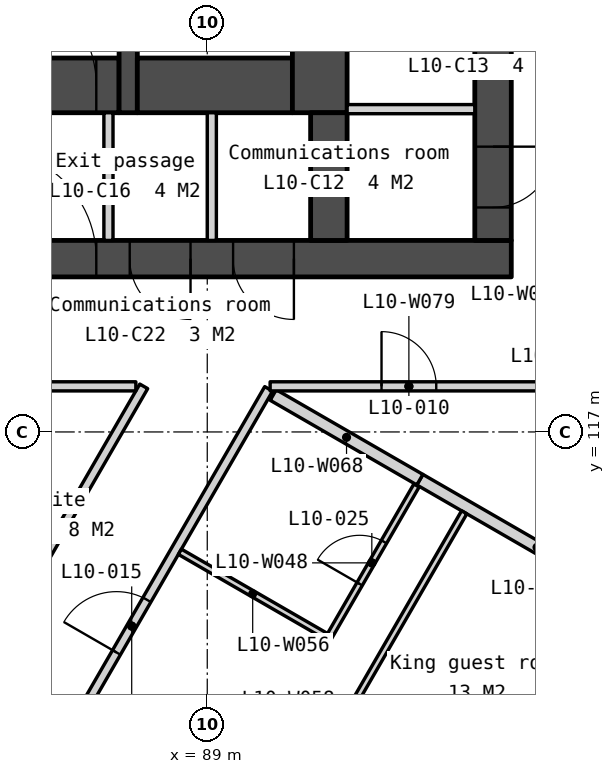
"""IFC4 building model, lengths in metres.
Left out: names, types, materials, properties, quantities, classifications, styles, units other than length and angle.
Written with IfcOpenShell. Run it as: python <this file> out.ifc"""

import sys

from ifc_helpers import new_model, si_unit, direction, frame, frame_2d, origin, place, context, subcontext, project, spatial, polyline, rectangle, outline, extrude, element, fill, save


model = new_model("IFC4")
c1 = context("Model", 3, precision=1e-05, world=origin(), true_north=direction((0.0, 1.0)))
c2 = subcontext(c1, "Body", "Model", "MODEL_VIEW")
j1 = project(units=[si_unit("LENGTHUNIT", "METRE"), si_unit("PLANEANGLEUNIT", "RADIAN")], contexts=[c1])
p1 = place(None, origin())
s1 = spatial("IfcSite", under=j1, at=p1, CompositionType="ELEMENT")
p2 = place(p1, origin())
s2 = spatial("IfcBuilding", under=s1, at=p2, CompositionType="ELEMENT")
p3 = place(p2, frame((0.0, 0.0, 49.0)))
s3 = spatial("IfcBuildingStorey", under=s2, at=p3, CompositionType="ELEMENT", Elevation=49.0)
p4 = place(p3, frame((66.0, 119.85, 0.0), z_axis=(0.0, 0.0, 1.0), x_axis=(1.0, 0.0, 0.0)))
e1 = element("IfcWall", 1, at=p4, inside=s3, PredefinedType="SOLIDWALL", context=c2, shape_type="SweptSolid", body=[
    extrude(rectangle(XDim=28.0, YDim=0.6, at=frame_2d((14.0, 0.0))), origin(), (0.0, 0.0, 1.0), 3.35),
])
p5 = place(p4, frame((6.825, 0.0, 0.0)))
e2 = element("IfcOpeningElement", 2, at=p5, cuts=e1, PredefinedType="OPENING", context=c2, shape_type="SweptSolid", body=[
    extrude(rectangle(XDim=1.8, YDim=2.1, at=frame_2d((0.9, 1.05))), frame((0.0, 0.31, 0.0), z_axis=(0.0, -1.0, 0.0), x_axis=(1.0, 0.0, 0.0)), (0.0, 0.0, 1.0), 0.62),
])
p6 = place(p4, frame((15.85, 0.0, 0.0)))
e3 = element("IfcOpeningElement", 3, at=p6, cuts=e1, PredefinedType="OPENING", context=c2, shape_type="SweptSolid", body=[
    extrude(rectangle(XDim=1.5, YDim=2.1, at=frame_2d((0.75, 1.05))), frame((0.0, 0.31, 0.0), z_axis=(0.0, -1.0, 0.0), x_axis=(1.0, 0.0, 0.0)), (0.0, 0.0, 1.0), 0.62),
])
p7 = place(p4, frame((19.375, 0.0, 0.0)))
e4 = element("IfcOpeningElement", 4, at=p7, cuts=e1, PredefinedType="OPENING", context=c2, shape_type="SweptSolid", body=[
    extrude(rectangle(XDim=1.8, YDim=2.1, at=frame_2d((0.9, 1.05))), frame((0.0, 0.31, 0.0), z_axis=(0.0, -1.0, 0.0), x_axis=(1.0, 0.0, 0.0)), (0.0, 0.0, 1.0), 0.62),
])
p8 = place(p4, frame((4.425, 0.0, 0.0)))
e5 = element("IfcOpeningElement", 5, at=p8, cuts=e1, PredefinedType="OPENING", context=c2, shape_type="SweptSolid", body=[
    extrude(rectangle(XDim=1.0, YDim=2.1, at=frame_2d((0.5, 1.05))), frame((0.0, 0.31, 0.0), z_axis=(0.0, -1.0, 0.0), x_axis=(1.0, 0.0, 0.0)), (0.0, 0.0, 1.0), 0.62),
])
p9 = place(p4, frame((9.783, 0.0, 0.0)))
e6 = element("IfcOpeningElement", 6, at=p9, cuts=e1, PredefinedType="OPENING", context=c2, shape_type="SweptSolid", body=[
    extrude(rectangle(XDim=1.0, YDim=2.1, at=frame_2d((0.5, 1.05))), frame((0.0, 0.31, 0.0), z_axis=(0.0, -1.0, 0.0), x_axis=(1.0, 0.0, 0.0)), (0.0, 0.0, 1.0), 0.62),
])
p10 = place(p4, frame((11.525, 0.0, 0.0)))
e7 = element("IfcOpeningElement", 7, at=p10, cuts=e1, PredefinedType="OPENING", context=c2, shape_type="SweptSolid", body=[
    extrude(rectangle(XDim=1.0, YDim=2.1, at=frame_2d((0.5, 1.05))), frame((0.0, 0.31, 0.0), z_axis=(0.0, -1.0, 0.0), x_axis=(1.0, 0.0, 0.0)), (0.0, 0.0, 1.0), 0.62),
])
p11 = place(p4, frame((13.658, 0.0, 0.0)))
e8 = element("IfcOpeningElement", 8, at=p11, cuts=e1, PredefinedType="OPENING", context=c2, shape_type="SweptSolid", body=[
    extrude(rectangle(XDim=1.0, YDim=2.1, at=frame_2d((0.5, 1.05))), frame((0.0, 0.31, 0.0), z_axis=(0.0, -1.0, 0.0), x_axis=(1.0, 0.0, 0.0)), (0.0, 0.0, 1.0), 0.62),
])
p12 = place(p4, frame((21.725, 0.0, 0.0)))
e9 = element("IfcOpeningElement", 9, at=p12, cuts=e1, PredefinedType="OPENING", context=c2, shape_type="SweptSolid", body=[
    extrude(rectangle(XDim=1.0, YDim=2.1, at=frame_2d((0.5, 1.05))), frame((0.0, 0.31, 0.0), z_axis=(0.0, -1.0, 0.0), x_axis=(1.0, 0.0, 0.0)), (0.0, 0.0, 1.0), 0.62),
])
p13 = place(p4, frame((23.425, 0.0, 0.0)))
e10 = element("IfcOpeningElement", 10, at=p13, cuts=e1, PredefinedType="OPENING", context=c2, shape_type="SweptSolid", body=[
    extrude(rectangle(XDim=1.0, YDim=2.1, at=frame_2d((0.5, 1.05))), frame((0.0, 0.31, 0.0), z_axis=(0.0, -1.0, 0.0), x_axis=(1.0, 0.0, 0.0)), (0.0, 0.0, 1.0), 0.62),
])
p14 = place(p3, frame((85.0, 122.7, 0.0), z_axis=(0.0, 0.0, 1.0), x_axis=(1.0, 0.0, 0.0)))
e11 = element("IfcWall", 11, at=p14, inside=s3, PredefinedType="SOLIDWALL", context=c2, shape_type="SweptSolid", body=[
    extrude(rectangle(XDim=2.55, YDim=0.9, at=frame_2d((1.275, 0.0))), origin(), (0.0, 0.0, 1.0), 3.35),
])
p15 = place(p14, frame((0.375, 0.0, 0.0)))
e12 = element("IfcOpeningElement", 12, at=p15, cuts=e11, PredefinedType="OPENING", context=c2, shape_type="SweptSolid", body=[
    extrude(rectangle(XDim=1.8, YDim=2.1, at=frame_2d((0.9, 1.05))), frame((0.0, 0.46, 0.0), z_axis=(0.0, -1.0, 0.0), x_axis=(1.0, 0.0, 0.0)), (0.0, 0.0, 1.0), 0.92),
])
p16 = place(p3, frame((87.375, 122.25, 0.0), z_axis=(0.0, 0.0, 1.0), x_axis=(0.0, -1.0, 0.0)))
e13 = element("IfcWall", 13, at=p16, inside=s3, PredefinedType="PARTITIONING", context=c2, shape_type="SweptSolid", body=[
    extrude(rectangle(XDim=2.1, YDim=0.15, at=frame_2d((1.05, 0.0))), origin(), (0.0, 0.0, 1.0), 3.35),
])
p17 = place(p3, frame((87.7, 133.95, 0.0), z_axis=(0.0, 0.0, 1.0), x_axis=(0.0, -1.0, 0.0)))
e14 = element("IfcWall", 14, at=p17, inside=s3, PredefinedType="SOLIDWALL", context=c2, shape_type="SweptSolid", body=[
    extrude(rectangle(XDim=11.7, YDim=0.3, at=frame_2d((5.85, 0.0))), origin(), (0.0, 0.0, 1.0), 3.35),
])
p18 = place(p17, frame((6.95, 0.0, 0.0)))
e15 = element("IfcOpeningElement", 15, at=p18, cuts=e14, PredefinedType="OPENING", context=c2, shape_type="SweptSolid", body=[
    extrude(rectangle(XDim=1.1, YDim=2.1, at=frame_2d((0.55, 1.05))), frame((0.0, 0.16, 0.0), z_axis=(0.0, -1.0, 0.0), x_axis=(1.0, 0.0, 0.0)), (0.0, 0.0, 1.0), 0.32),
])
p19 = place(p17, frame((5.1, 0.0, 0.0)))
e16 = element("IfcOpeningElement", 16, at=p19, cuts=e14, PredefinedType="OPENING", context=c2, shape_type="SweptSolid", body=[
    extrude(rectangle(XDim=1.0, YDim=2.1, at=frame_2d((0.5, 1.05))), frame((0.0, 0.16, 0.0), z_axis=(0.0, -1.0, 0.0), x_axis=(1.0, 0.0, 0.0)), (0.0, 0.0, 1.0), 0.32),
])
p20 = place(p17, frame((9.25, 0.0, 0.0)))
e17 = element("IfcOpeningElement", 17, at=p20, cuts=e14, PredefinedType="OPENING", context=c2, shape_type="SweptSolid", body=[
    extrude(rectangle(XDim=1.1, YDim=2.1, at=frame_2d((0.55, 1.05))), frame((0.0, 0.16, 0.0), z_axis=(0.0, -1.0, 0.0), x_axis=(1.0, 0.0, 0.0)), (0.0, 0.0, 1.0), 0.32),
])
p21 = place(p3, frame((87.85, 122.7, 0.0), z_axis=(0.0, 0.0, 1.0), x_axis=(1.0, 0.0, 0.0)))
e18 = element("IfcWall", 18, at=p21, inside=s3, PredefinedType="SOLIDWALL", context=c2, shape_type="SweptSolid", body=[
    extrude(rectangle(XDim=2.55, YDim=0.9, at=frame_2d((1.275, 0.0))), origin(), (0.0, 0.0, 1.0), 3.35),
])
p22 = place(p3, frame((89.075, 122.25, 0.0), z_axis=(0.0, 0.0, 1.0), x_axis=(0.0, -1.0, 0.0)))
e19 = element("IfcWall", 19, at=p22, inside=s3, PredefinedType="PARTITIONING", context=c2, shape_type="SweptSolid", body=[
    extrude(rectangle(XDim=2.1, YDim=0.15, at=frame_2d((1.05, 0.0))), origin(), (0.0, 0.0, 1.0), 3.35),
])
p23 = place(p3, frame((90.85, 133.95, 0.0), z_axis=(0.0, 0.0, 1.0), x_axis=(0.0, -1.0, 0.0)))
e20 = element("IfcWall", 20, at=p23, inside=s3, PredefinedType="SOLIDWALL", context=c2, shape_type="SweptSolid", body=[
    extrude(rectangle(XDim=11.7, YDim=0.9, at=frame_2d((5.85, 0.0))), origin(), (0.0, 0.0, 1.0), 3.35),
])
p24 = place(p3, frame((91.0, 122.25, 0.0), z_axis=(0.0, 0.0, 1.0), x_axis=(0.0, -1.0, 0.0)))
e21 = element("IfcWall", 21, at=p24, inside=s3, PredefinedType="SOLIDWALL", context=c2, shape_type="SweptSolid", body=[
    extrude(rectangle(XDim=2.1, YDim=0.6, at=frame_2d((1.05, 0.0))), origin(), (0.0, 0.0, 1.0), 3.35),
])
p25 = place(p3, frame((91.3, 122.309, 0.0), z_axis=(0.0, 0.0, 1.0), x_axis=(1.0, 0.0, 0.0)))
e22 = element("IfcWall", 22, at=p25, inside=s3, PredefinedType="PARTITIONING", context=c2, shape_type="SweptSolid", body=[
    extrude(rectangle(XDim=2.1, YDim=0.15, at=frame_2d((1.05, 0.0))), origin(), (0.0, 0.0, 1.0), 3.35),
])
p26 = place(p3, frame((93.7, 133.95, 0.0), z_axis=(0.0, 0.0, 1.0), x_axis=(0.0, -1.0, 0.0)))
e23 = element("IfcWall", 23, at=p26, inside=s3, PredefinedType="SOLIDWALL", context=c2, shape_type="SweptSolid", body=[
    extrude(rectangle(XDim=13.8, YDim=0.6, at=frame_2d((6.9, 0.0))), origin(), (0.0, 0.0, 1.0), 3.35),
])
p27 = place(p26, frame((0.6, 0.0, 0.0)))
e24 = element("IfcOpeningElement", 24, at=p27, cuts=e23, PredefinedType="OPENING", context=c2, shape_type="SweptSolid", body=[
    extrude(rectangle(XDim=1.1, YDim=2.1, at=frame_2d((0.55, 1.05))), frame((0.0, 0.31, 0.0), z_axis=(0.0, -1.0, 0.0), x_axis=(1.0, 0.0, 0.0)), (0.0, 0.0, 1.0), 0.62),
])
p28 = place(p26, frame((8.35, 0.0, 0.0)))
e25 = element("IfcOpeningElement", 25, at=p28, cuts=e23, PredefinedType="OPENING", context=c2, shape_type="SweptSolid", body=[
    extrude(rectangle(XDim=0.826, YDim=2.1, at=frame_2d((0.413, 1.05))), frame((0.0, 0.31, 0.0), z_axis=(0.0, -1.0, 0.0), x_axis=(1.0, 0.0, 0.0)), (0.0, 0.0, 1.0), 0.62),
])
p29 = place(p26, frame((10.071, 0.0, 0.0)))
e26 = element("IfcOpeningElement", 26, at=p29, cuts=e23, PredefinedType="OPENING", context=c2, shape_type="SweptSolid", body=[
    extrude(rectangle(XDim=1.0, YDim=2.1, at=frame_2d((0.5, 1.05))), frame((0.0, 0.31, 0.0), z_axis=(0.0, -1.0, 0.0), x_axis=(1.0, 0.0, 0.0)), (0.0, 0.0, 1.0), 0.62),
])
p30 = place(p26, frame((12.258, 0.0, 0.0)))
e27 = element("IfcOpeningElement", 27, at=p30, cuts=e23, PredefinedType="OPENING", context=c2, shape_type="SweptSolid", body=[
    extrude(rectangle(XDim=1.0, YDim=2.1, at=frame_2d((0.5, 1.05))), frame((0.0, 0.31, 0.0), z_axis=(0.0, -1.0, 0.0), x_axis=(1.0, 0.0, 0.0)), (0.0, 0.0, 1.0), 0.62),
])
p31 = place(p3, frame((83.105, 90.599, -0.15), z_axis=(0.0, 0.0, 1.0), x_axis=(0.499999201451, 0.866025864826, 0.0)))
e28 = element("IfcWall", 28, at=p31, inside=s3, PredefinedType="SOLIDWALL", context=c2, shape_type="SweptSolid", body=[
    extrude(outline(polyline([(44.8, 0.0), (44.8, 3.5), (0.0, 3.5), (0.0, 0.0), (44.8, 0.0)])), frame((0.0, 0.225, 0.0), z_axis=(0.0, -1.0, 0.0), x_axis=(1.0, 0.0, 0.0)), (0.0, 0.0, 1.0), 0.45),
])
p32 = place(p31, frame((2.43, 0.0, 1.05)))
e29 = element("IfcOpeningElement", 29, at=p32, cuts=e28, PredefinedType="OPENING", context=c2, shape_type="SweptSolid", body=[
    extrude(rectangle(XDim=1.8, YDim=1.5, at=frame_2d((0.9, 0.75))), frame((0.0, 0.235, 0.0), z_axis=(0.0, -1.0, 0.0), x_axis=(1.0, 0.0, 0.0)), (0.0, 0.0, 1.0), 0.47),
])
p33 = place(p31, frame((4.73, 0.0, 1.05)))
e30 = element("IfcOpeningElement", 30, at=p33, cuts=e28, PredefinedType="OPENING", context=c2, shape_type="SweptSolid", body=[
    extrude(rectangle(XDim=1.8, YDim=1.5, at=frame_2d((0.9, 0.75))), frame((0.0, 0.235, 0.0), z_axis=(0.0, -1.0, 0.0), x_axis=(1.0, 0.0, 0.0)), (0.0, 0.0, 1.0), 0.47),
])
p34 = place(p31, frame((11.39, 0.0, 1.05)))
e31 = element("IfcOpeningElement", 31, at=p34, cuts=e28, PredefinedType="OPENING", context=c2, shape_type="SweptSolid", body=[
    extrude(rectangle(XDim=1.8, YDim=1.5, at=frame_2d((0.9, 0.75))), frame((0.0, 0.235, 0.0), z_axis=(0.0, -1.0, 0.0), x_axis=(1.0, 0.0, 0.0)), (0.0, 0.0, 1.0), 0.47),
])
p35 = place(p31, frame((13.69, 0.0, 1.05)))
e32 = element("IfcOpeningElement", 32, at=p35, cuts=e28, PredefinedType="OPENING", context=c2, shape_type="SweptSolid", body=[
    extrude(rectangle(XDim=1.8, YDim=1.5, at=frame_2d((0.9, 0.75))), frame((0.0, 0.235, 0.0), z_axis=(0.0, -1.0, 0.0), x_axis=(1.0, 0.0, 0.0)), (0.0, 0.0, 1.0), 0.47),
])
p36 = place(p31, frame((20.35, 0.0, 1.05)))
e33 = element("IfcOpeningElement", 33, at=p36, cuts=e28, PredefinedType="OPENING", context=c2, shape_type="SweptSolid", body=[
    extrude(rectangle(XDim=1.8, YDim=1.5, at=frame_2d((0.9, 0.75))), frame((0.0, 0.235, 0.0), z_axis=(0.0, -1.0, 0.0), x_axis=(1.0, 0.0, 0.0)), (0.0, 0.0, 1.0), 0.47),
])
p37 = place(p31, frame((22.65, 0.0, 1.05)))
e34 = element("IfcOpeningElement", 34, at=p37, cuts=e28, PredefinedType="OPENING", context=c2, shape_type="SweptSolid", body=[
    extrude(rectangle(XDim=1.8, YDim=1.5, at=frame_2d((0.9, 0.75))), frame((0.0, 0.235, 0.0), z_axis=(0.0, -1.0, 0.0), x_axis=(1.0, 0.0, 0.0)), (0.0, 0.0, 1.0), 0.47),
])
p38 = place(p31, frame((29.31, 0.0, 1.05)))
e35 = element("IfcOpeningElement", 35, at=p38, cuts=e28, PredefinedType="OPENING", context=c2, shape_type="SweptSolid", body=[
    extrude(rectangle(XDim=1.8, YDim=1.5, at=frame_2d((0.9, 0.75))), frame((0.0, 0.235, 0.0), z_axis=(0.0, -1.0, 0.0), x_axis=(1.0, 0.0, 0.0)), (0.0, 0.0, 1.0), 0.47),
])
p39 = place(p31, frame((31.61, 0.0, 1.05)))
e36 = element("IfcOpeningElement", 36, at=p39, cuts=e28, PredefinedType="OPENING", context=c2, shape_type="SweptSolid", body=[
    extrude(rectangle(XDim=1.8, YDim=1.5, at=frame_2d((0.9, 0.75))), frame((0.0, 0.235, 0.0), z_axis=(0.0, -1.0, 0.0), x_axis=(1.0, 0.0, 0.0)), (0.0, 0.0, 1.0), 0.47),
])
p40 = place(p31, frame((38.27, 0.0, 1.05)))
e37 = element("IfcOpeningElement", 37, at=p40, cuts=e28, PredefinedType="OPENING", context=c2, shape_type="SweptSolid", body=[
    extrude(rectangle(XDim=1.8, YDim=1.5, at=frame_2d((0.9, 0.75))), frame((0.0, 0.235, 0.0), z_axis=(0.0, -1.0, 0.0), x_axis=(1.0, 0.0, 0.0)), (0.0, 0.0, 1.0), 0.47),
])
p41 = place(p31, frame((40.57, 0.0, 1.05)))
e38 = element("IfcOpeningElement", 38, at=p41, cuts=e28, PredefinedType="OPENING", context=c2, shape_type="SweptSolid", body=[
    extrude(rectangle(XDim=1.8, YDim=1.5, at=frame_2d((0.9, 0.75))), frame((0.0, 0.235, 0.0), z_axis=(0.0, -1.0, 0.0), x_axis=(1.0, 0.0, 0.0)), (0.0, 0.0, 1.0), 0.47),
])
p42 = place(p3, frame((85.505, 109.906, 0.0), z_axis=(0.0, 0.0, 1.0), x_axis=(0.500017993482, 0.866015014994, 0.0)))
e39 = element("IfcWall", 39, at=p42, inside=s3, PredefinedType="PARTITIONING", context=c2, shape_type="SweptSolid", body=[
    extrude(rectangle(XDim=9.01, YDim=0.15, at=frame_2d((4.505, 0.0))), origin(), (0.0, 0.0, 1.0), 3.35),
])
p43 = place(p42, frame((4.005, 0.0, 0.0)))
e40 = element("IfcOpeningElement", 40, at=p43, cuts=e39, PredefinedType="OPENING", context=c2, shape_type="SweptSolid", body=[
    extrude(rectangle(XDim=1.0, YDim=2.1, at=frame_2d((0.5, 1.05))), frame((0.0, 0.085, 0.0), z_axis=(0.0, -1.0, 0.0), x_axis=(1.0, 0.0, 0.0)), (0.0, 0.0, 1.0), 0.17),
])
p44 = place(p3, frame((90.971, 113.574, 0.0), z_axis=(0.0, 0.0, 1.0), x_axis=(0.499988418424, 0.866032090307, 0.0)))
e41 = element("IfcWall", 41, at=p44, inside=s3, PredefinedType="PARTITIONING", context=c2, shape_type="SweptSolid", body=[
    extrude(rectangle(XDim=2.94, YDim=0.1, at=frame_2d((1.47, 0.0))), origin(), (0.0, 0.0, 1.0), 3.35),
])
p45 = place(p44, frame((1.07, 0.0, 0.0)))
e42 = element("IfcOpeningElement", 42, at=p45, cuts=e41, PredefinedType="OPENING", context=c2, shape_type="SweptSolid", body=[
    extrude(rectangle(XDim=0.8, YDim=2.1, at=frame_2d((0.4, 1.05))), frame((0.0, 0.06, 0.0), z_axis=(0.0, -1.0, 0.0), x_axis=(1.0, 0.0, 0.0)), (0.0, 0.0, 1.0), 0.12),
])
p46 = place(p3, frame((92.497, 116.215, 0.0), z_axis=(0.0, 0.0, 1.0), x_axis=(0.866012907634, -0.500021643343, 0.0)))
e43 = element("IfcWall", 43, at=p46, inside=s3, PredefinedType="PARTITIONING", context=c2, shape_type="SweptSolid", body=[
    extrude(rectangle(XDim=4.45, YDim=0.2, at=frame_2d((2.225, 0.0))), origin(), (0.0, 0.0, 1.0), 3.35),
])
p47 = place(p3, frame((88.55, 115.03, 0.0), z_axis=(0.0, 0.0, 1.0), x_axis=(0.866012076814, -0.50002308228, 0.0)))
e44 = element("IfcWall", 44, at=p47, inside=s3, PredefinedType="PARTITIONING", context=c2, shape_type="SweptSolid", body=[
    extrude(rectangle(XDim=2.765, YDim=0.1, at=frame_2d((1.382, 0.0))), origin(), (0.0, 0.0, 1.0), 3.35),
])
p48 = place(p3, frame((88.851, 108.101, 0.0), z_axis=(0.0, 0.0, 1.0), x_axis=(0.500004234368, 0.866022959057, 0.0)))
e45 = element("IfcWall", 45, at=p48, inside=s3, PredefinedType="PARTITIONING", context=c2, shape_type="SweptSolid", body=[
    extrude(rectangle(XDim=8.75, YDim=0.1, at=frame_2d((4.375, 0.0))), origin(), (0.0, 0.0, 1.0), 3.35),
])
p49 = place(p48, frame((3.925, 0.0, 0.0)))
e46 = element("IfcOpeningElement", 46, at=p49, cuts=e45, PredefinedType="OPENING", context=c2, shape_type="SweptSolid", body=[
    extrude(rectangle(XDim=0.9, YDim=2.1, at=frame_2d((0.45, 1.05))), frame((0.0, 0.06, 0.0), z_axis=(0.0, -1.0, 0.0), x_axis=(1.0, 0.0, 0.0)), (0.0, 0.0, 1.0), 0.12),
])
p50 = place(p3, frame((90.085, 117.608, 0.0), z_axis=(0.0, 0.0, 1.0), x_axis=(0.866011863948, -0.500023450952, 0.0)))
e47 = element("IfcWall", 47, at=p50, inside=s3, PredefinedType="PARTITIONING", context=c2, shape_type="SweptSolid", body=[
    extrude(rectangle(XDim=2.785, YDim=0.2, at=frame_2d((1.393, 0.0))), origin(), (0.0, 0.0, 1.0), 3.35),
])
p51 = place(p3, frame((81.46, 106.499, 0.0), z_axis=(0.0, 0.0, 1.0), x_axis=(0.49999954256, 0.866025667887, 0.0)))
e48 = element("IfcWall", 48, at=p51, inside=s3, PredefinedType="PARTITIONING", context=c2, shape_type="SweptSolid", body=[
    extrude(rectangle(XDim=12.991, YDim=0.15, at=frame_2d((6.496, 0.0))), origin(), (0.0, 0.0, 1.0), 3.35),
])
p52 = place(p51, frame((6.046, 0.0, 0.0)))
e49 = element("IfcOpeningElement", 49, at=p52, cuts=e48, PredefinedType="OPENING", context=c2, shape_type="SweptSolid", body=[
    extrude(rectangle(XDim=0.9, YDim=2.1, at=frame_2d((0.45, 1.05))), frame((0.0, 0.085, 0.0), z_axis=(0.0, -1.0, 0.0), x_axis=(1.0, 0.0, 0.0)), (0.0, 0.0, 1.0), 0.17),
])
p53 = place(p3, frame((81.46, 117.75, 0.0), z_axis=(0.0, 0.0, 1.0), x_axis=(1.0, 0.0, 0.0)))
e50 = element("IfcWall", 50, at=p53, inside=s3, PredefinedType="PARTITIONING", context=c2, shape_type="SweptSolid", body=[
    extrude(rectangle(XDim=6.366, YDim=0.15, at=frame_2d((3.183, 0.0))), origin(), (0.0, 0.0, 1.0), 3.35),
])
p54 = place(p3, frame((90.034, 117.75, 0.0), z_axis=(0.0, 0.0, 1.0), x_axis=(1.0, 0.0, 0.0)))
e51 = element("IfcWall", 51, at=p54, inside=s3, PredefinedType="PARTITIONING", context=c2, shape_type="SweptSolid", body=[
    extrude(rectangle(XDim=4.564, YDim=0.15, at=frame_2d((2.282, 0.0))), origin(), (0.0, 0.0, 1.0), 3.35),
])
p55 = place(p54, frame((1.832, 0.0, 0.0)))
e52 = element("IfcOpeningElement", 52, at=p55, cuts=e51, PredefinedType="OPENING", context=c2, shape_type="SweptSolid", body=[
    extrude(rectangle(XDim=0.9, YDim=2.1, at=frame_2d((0.45, 1.05))), frame((0.0, 0.085, 0.0), z_axis=(0.0, -1.0, 0.0), x_axis=(1.0, 0.0, 0.0)), (0.0, 0.0, 1.0), 0.17),
])
p56 = place(p29, origin())
e53 = element("IfcDoor", 53, at=p56, inside=s3, OperationType="SINGLE_SWING_LEFT", PredefinedType="DOOR", context=c2, shape_type="SweptSolid", body=[
    extrude(rectangle(XDim=1.0, YDim=2.1, at=frame_2d((0.5, 1.05))), frame((0.0, 0.025, 0.0), z_axis=(0.0, -1.0, 0.0), x_axis=(1.0, 0.0, 0.0)), (0.0, 0.0, 1.0), 0.05),
])
fill(e26, e53)
p57 = place(p30, origin())
e54 = element("IfcDoor", 54, at=p57, inside=s3, OperationType="SINGLE_SWING_LEFT", PredefinedType="DOOR", context=c2, shape_type="SweptSolid", body=[
    extrude(rectangle(XDim=1.0, YDim=2.1, at=frame_2d((0.5, 1.05))), frame((0.0, 0.025, 0.0), z_axis=(0.0, -1.0, 0.0), x_axis=(1.0, 0.0, 0.0)), (0.0, 0.0, 1.0), 0.05),
])
fill(e27, e54)
p58 = place(p15, origin())
e55 = element("IfcDoor", 55, at=p58, inside=s3, OperationType="DOUBLE_DOOR_DOUBLE_SWING", PredefinedType="DOOR", context=c2, shape_type="SweptSolid", body=[
    extrude(rectangle(XDim=1.8, YDim=2.1, at=frame_2d((0.9, 1.05))), frame((0.0, 0.025, 0.0), z_axis=(0.0, -1.0, 0.0), x_axis=(1.0, 0.0, 0.0)), (0.0, 0.0, 1.0), 0.05),
])
fill(e12, e55)
p59 = place(p7, origin())
e56 = element("IfcDoor", 56, at=p59, inside=s3, OperationType="DOUBLE_DOOR_DOUBLE_SWING", PredefinedType="DOOR", context=c2, shape_type="SweptSolid", body=[
    extrude(rectangle(XDim=1.8, YDim=2.1, at=frame_2d((0.9, 1.05))), frame((0.0, 0.025, 0.0), z_axis=(0.0, -1.0, 0.0), x_axis=(1.0, 0.0, 0.0)), (0.0, 0.0, 1.0), 0.05),
])
fill(e4, e56)
p60 = place(p12, origin())
e57 = element("IfcDoor", 57, at=p60, inside=s3, OperationType="SINGLE_SWING_RIGHT", PredefinedType="DOOR", context=c2, shape_type="SweptSolid", body=[
    extrude(rectangle(XDim=1.0, YDim=2.1, at=frame_2d((0.5, 1.05))), frame((0.0, 0.025, 0.0), z_axis=(0.0, -1.0, 0.0), x_axis=(1.0, 0.0, 0.0)), (0.0, 0.0, 1.0), 0.05),
])
fill(e9, e57)
p61 = place(p13, origin())
e58 = element("IfcDoor", 58, at=p61, inside=s3, OperationType="SINGLE_SWING_RIGHT", PredefinedType="DOOR", context=c2, shape_type="SweptSolid", body=[
    extrude(rectangle(XDim=1.0, YDim=2.1, at=frame_2d((0.5, 1.05))), frame((0.0, 0.025, 0.0), z_axis=(0.0, -1.0, 0.0), x_axis=(1.0, 0.0, 0.0)), (0.0, 0.0, 1.0), 0.05),
])
fill(e10, e58)
p62 = place(p55, origin())
e59 = element("IfcDoor", 59, at=p62, inside=s3, OperationType="SINGLE_SWING_LEFT", PredefinedType="DOOR", context=c2, shape_type="SweptSolid", body=[
    extrude(rectangle(XDim=0.9, YDim=2.1, at=frame_2d((0.45, 1.05))), frame((0.0, 0.025, 0.0), z_axis=(0.0, -1.0, 0.0), x_axis=(1.0, 0.0, 0.0)), (0.0, 0.0, 1.0), 0.05),
])
fill(e52, e59)
p63 = place(p43, origin())
e60 = element("IfcDoor", 60, at=p63, inside=s3, OperationType="SINGLE_SWING_LEFT", PredefinedType="DOOR", context=c2, shape_type="SweptSolid", body=[
    extrude(rectangle(XDim=1.0, YDim=2.1, at=frame_2d((0.5, 1.05))), frame((0.0, 0.025, 0.0), z_axis=(0.0, -1.0, 0.0), x_axis=(1.0, 0.0, 0.0)), (0.0, 0.0, 1.0), 0.05),
])
fill(e40, e60)
p64 = place(p45, origin())
e61 = element("IfcDoor", 61, at=p64, inside=s3, OperationType="SINGLE_SWING_LEFT", PredefinedType="DOOR", context=c2, shape_type="SweptSolid", body=[
    extrude(rectangle(XDim=0.8, YDim=2.1, at=frame_2d((0.4, 1.05))), frame((0.0, 0.025, 0.0), z_axis=(0.0, -1.0, 0.0), x_axis=(1.0, 0.0, 0.0)), (0.0, 0.0, 1.0), 0.05),
])
fill(e42, e61)
save(model, sys.argv[1])
